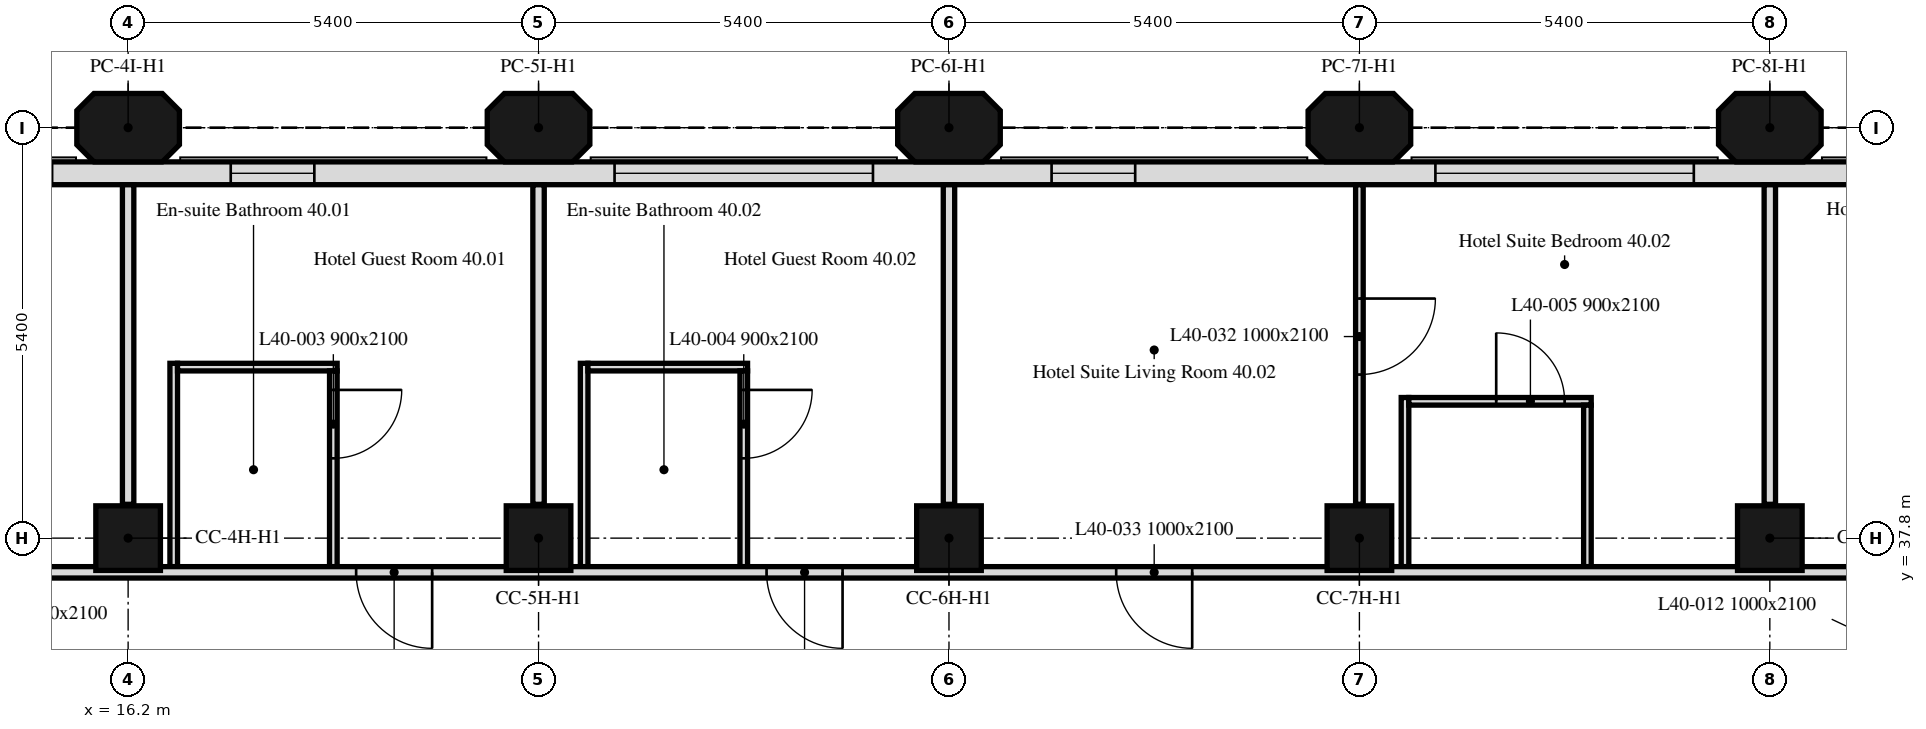
"""IFC4 building model, lengths in metres.
Left out: names, types, materials, properties, quantities, classifications, styles, units other than length and angle.
Written with IfcOpenShell. Run it as: python <this file> out.ifc"""

import sys

from ifc_helpers import new_model, si_unit, direction, frame, frame_2d, origin, origin_2d, place, context, subcontext, project, spatial, polyline, rectangle, outline, extrude, element, fill, save


model = new_model("IFC4")
c1 = context("Model", 3, precision=1e-05, world=origin(), true_north=direction((0.0, 1.0)))
c2 = subcontext(c1, "Body", "Model", "MODEL_VIEW")
j1 = project(units=[si_unit("LENGTHUNIT", "METRE"), si_unit("PLANEANGLEUNIT", "RADIAN")], contexts=[c1])
p1 = place(None, origin())
s1 = spatial("IfcSite", under=j1, at=p1, CompositionType="ELEMENT")
p2 = place(p1, origin())
s2 = spatial("IfcBuilding", under=s1, at=p2, CompositionType="ELEMENT")
p3 = place(p2, frame((0.0, 0.0, 169.3)))
s3 = spatial("IfcBuildingStorey", under=s2, at=p3, CompositionType="ELEMENT", Elevation=169.3)
for number, where, z_axis, x_axis in (
    (1, (16.2, 37.8, 0.0), (0.0, 0.0, 1.0), (1.0, 0.0, 0.0)),
    (2, (21.6, 37.8, 0.0), (0.0, 0.0, 1.0), (1.0, 0.0, 0.0)),
    (3, (27.0, 37.8, 0.0), (0.0, 0.0, 1.0), (1.0, 0.0, 0.0)),
    (4, (32.4, 37.8, 0.0), (0.0, 0.0, 1.0), (1.0, 0.0, 0.0)),
    (5, (37.8, 37.8, 0.0), (0.0, 0.0, 1.0), (1.0, 0.0, 0.0)),
):
    element("IfcColumn", number, at=place(p3, frame(where, z_axis=z_axis, x_axis=x_axis)), inside=s3, PredefinedType="COLUMN", context=c2, shape_type="SweptSolid", body=[
        extrude(rectangle(XDim=0.85, YDim=0.85, at=origin_2d()), origin(), (0.0, 0.0, 1.0), 3.0),
    ])
for number, where, z_axis, x_axis in (
    (6, (16.2, 43.2, 0.0), (0.0, 0.0, 1.0), (1.0, 0.0, 0.0)),
    (7, (21.6, 43.2, 0.0), (0.0, 0.0, 1.0), (1.0, 0.0, 0.0)),
    (8, (27.0, 43.2, 0.0), (0.0, 0.0, 1.0), (1.0, 0.0, 0.0)),
    (9, (32.4, 43.2, 0.0), (0.0, 0.0, 1.0), (1.0, 0.0, 0.0)),
    (10, (37.8, 43.2, 0.0), (0.0, 0.0, 1.0), (1.0, 0.0, 0.0)),
):
    element("IfcColumn", number, at=place(p3, frame(where, z_axis=z_axis, x_axis=x_axis)), inside=s3, PredefinedType="COLUMN", context=c2, shape_type="SweptSolid", body=[
        extrude(outline(polyline([(-0.45, -0.45), (0.45, -0.45), (0.675, -0.225), (0.675, 0.225), (0.45, 0.45), (-0.45, 0.45), (-0.675, 0.225), (-0.675, -0.225), (-0.45, -0.45)])), origin(), (0.0, 0.0, 1.0), 3.0),
    ])
p4 = place(p3, frame((43.014, 42.6, 0.0), z_axis=(0.0, 0.0, 1.0), x_axis=(-1.0, 0.0, 0.0)))
e11 = element("IfcWall", 11, at=p4, inside=s3, PredefinedType="SOLIDWALL", context=c2, shape_type="SweptSolid", body=[
    extrude(rectangle(XDim=32.027, YDim=0.3, at=frame_2d((16.014, 0.0))), origin(), (0.0, 0.0, 1.0), 3.0),
])
p5 = place(p4, frame((2.764, 0.0, 0.9)))
e12 = element("IfcOpeningElement", 12, at=p5, cuts=e11, PredefinedType="OPENING", context=c2, shape_type="SweptSolid", body=[
    extrude(rectangle(XDim=1.1, YDim=1.7, at=frame_2d((0.55, 0.85))), frame((0.0, 0.16, 0.0), z_axis=(0.0, -1.0, 0.0), x_axis=(1.0, 0.0, 0.0)), (0.0, 0.0, 1.0), 0.32),
])
p6 = place(p4, frame((6.214, 0.0, 0.9)))
e13 = element("IfcOpeningElement", 13, at=p6, cuts=e11, PredefinedType="OPENING", context=c2, shape_type="SweptSolid", body=[
    extrude(rectangle(XDim=3.4, YDim=1.7, at=frame_2d((1.7, 0.85))), frame((0.0, 0.16, 0.0), z_axis=(0.0, -1.0, 0.0), x_axis=(1.0, 0.0, 0.0)), (0.0, 0.0, 1.0), 0.32),
])
p7 = place(p4, frame((13.564, 0.0, 0.9)))
e14 = element("IfcOpeningElement", 14, at=p7, cuts=e11, PredefinedType="OPENING", context=c2, shape_type="SweptSolid", body=[
    extrude(rectangle(XDim=1.1, YDim=1.7, at=frame_2d((0.55, 0.85))), frame((0.0, 0.16, 0.0), z_axis=(0.0, -1.0, 0.0), x_axis=(1.0, 0.0, 0.0)), (0.0, 0.0, 1.0), 0.32),
])
p8 = place(p4, frame((17.014, 0.0, 0.9)))
e15 = element("IfcOpeningElement", 15, at=p8, cuts=e11, PredefinedType="OPENING", context=c2, shape_type="SweptSolid", body=[
    extrude(rectangle(XDim=3.4, YDim=1.7, at=frame_2d((1.7, 0.85))), frame((0.0, 0.16, 0.0), z_axis=(0.0, -1.0, 0.0), x_axis=(1.0, 0.0, 0.0)), (0.0, 0.0, 1.0), 0.32),
])
p9 = place(p4, frame((24.364, 0.0, 0.9)))
e16 = element("IfcOpeningElement", 16, at=p9, cuts=e11, PredefinedType="OPENING", context=c2, shape_type="SweptSolid", body=[
    extrude(rectangle(XDim=1.1, YDim=1.7, at=frame_2d((0.55, 0.85))), frame((0.0, 0.16, 0.0), z_axis=(0.0, -1.0, 0.0), x_axis=(1.0, 0.0, 0.0)), (0.0, 0.0, 1.0), 0.32),
])
p10 = place(p4, frame((27.814, 0.0, 0.9)))
e17 = element("IfcOpeningElement", 17, at=p10, cuts=e11, PredefinedType="OPENING", context=c2, shape_type="SweptSolid", body=[
    extrude(rectangle(XDim=3.4, YDim=1.7, at=frame_2d((1.7, 0.85))), frame((0.0, 0.16, 0.0), z_axis=(0.0, -1.0, 0.0), x_axis=(1.0, 0.0, 0.0)), (0.0, 0.0, 1.0), 0.32),
])
p11 = place(p3, frame((16.2, 38.245, 0.0), z_axis=(0.0, 0.0, 1.0), x_axis=(0.0, 1.0, 0.0)))
e18 = element("IfcWall", 18, at=p11, inside=s3, PredefinedType="PARTITIONING", context=c2, shape_type="SweptSolid", body=[
    extrude(rectangle(XDim=4.204, YDim=0.15, at=frame_2d((2.102, 0.0))), origin(), (0.0, 0.0, 1.0), 3.0),
])
p12 = place(p3, frame((16.8, 37.425, 0.0), z_axis=(0.0, 0.0, 1.0), x_axis=(0.0, 1.0, 0.0)))
e19 = element("IfcWall", 19, at=p12, inside=s3, PredefinedType="PARTITIONING", context=c2, shape_type="SweptSolid", body=[
    extrude(rectangle(XDim=2.675, YDim=0.1, at=frame_2d((1.337, 0.0))), origin(), (0.0, 0.0, 1.0), 3.0),
])
p13 = place(p3, frame((16.85, 40.05, 0.0), z_axis=(0.0, 0.0, 1.0), x_axis=(1.0, 0.0, 0.0)))
e20 = element("IfcWall", 20, at=p13, inside=s3, PredefinedType="PARTITIONING", context=c2, shape_type="SweptSolid", body=[
    extrude(rectangle(XDim=2.1, YDim=0.1, at=frame_2d((1.05, 0.0))), origin(), (0.0, 0.0, 1.0), 3.0),
])
p14 = place(p3, frame((18.9, 40.0, 0.0), z_axis=(0.0, 0.0, 1.0), x_axis=(0.0, -1.0, 0.0)))
e21 = element("IfcWall", 21, at=p14, inside=s3, PredefinedType="PARTITIONING", context=c2, shape_type="SweptSolid", body=[
    extrude(rectangle(XDim=2.575, YDim=0.1, at=frame_2d((1.288, 0.0))), origin(), (0.0, 0.0, 1.0), 3.0),
])
p15 = place(p14, frame((0.25, 0.0, 0.0)))
e22 = element("IfcOpeningElement", 22, at=p15, cuts=e21, PredefinedType="OPENING", context=c2, shape_type="SweptSolid", body=[
    extrude(rectangle(XDim=0.9, YDim=2.1, at=frame_2d((0.45, 1.05))), frame((0.0, 0.05, 0.0), z_axis=(0.0, -1.0, 0.0), x_axis=(1.0, 0.0, 0.0)), (0.0, 0.0, 1.0), 0.1),
])
p16 = place(p3, frame((21.6, 38.245, 0.0), z_axis=(0.0, 0.0, 1.0), x_axis=(0.0, 1.0, 0.0)))
e23 = element("IfcWall", 23, at=p16, inside=s3, PredefinedType="PARTITIONING", context=c2, shape_type="SweptSolid", body=[
    extrude(rectangle(XDim=4.204, YDim=0.15, at=frame_2d((2.102, 0.0))), origin(), (0.0, 0.0, 1.0), 3.0),
])
p17 = place(p3, frame((22.2, 37.425, 0.0), z_axis=(0.0, 0.0, 1.0), x_axis=(0.0, 1.0, 0.0)))
e24 = element("IfcWall", 24, at=p17, inside=s3, PredefinedType="PARTITIONING", context=c2, shape_type="SweptSolid", body=[
    extrude(rectangle(XDim=2.675, YDim=0.1, at=frame_2d((1.337, 0.0))), origin(), (0.0, 0.0, 1.0), 3.0),
])
p18 = place(p3, frame((22.25, 40.05, 0.0), z_axis=(0.0, 0.0, 1.0), x_axis=(1.0, 0.0, 0.0)))
e25 = element("IfcWall", 25, at=p18, inside=s3, PredefinedType="PARTITIONING", context=c2, shape_type="SweptSolid", body=[
    extrude(rectangle(XDim=2.1, YDim=0.1, at=frame_2d((1.05, 0.0))), origin(), (0.0, 0.0, 1.0), 3.0),
])
p19 = place(p3, frame((24.3, 40.0, 0.0), z_axis=(0.0, 0.0, 1.0), x_axis=(0.0, -1.0, 0.0)))
e26 = element("IfcWall", 26, at=p19, inside=s3, PredefinedType="PARTITIONING", context=c2, shape_type="SweptSolid", body=[
    extrude(rectangle(XDim=2.575, YDim=0.1, at=frame_2d((1.288, 0.0))), origin(), (0.0, 0.0, 1.0), 3.0),
])
p20 = place(p19, frame((0.25, 0.0, 0.0)))
e27 = element("IfcOpeningElement", 27, at=p20, cuts=e26, PredefinedType="OPENING", context=c2, shape_type="SweptSolid", body=[
    extrude(rectangle(XDim=0.9, YDim=2.1, at=frame_2d((0.45, 1.05))), frame((0.0, 0.05, 0.0), z_axis=(0.0, -1.0, 0.0), x_axis=(1.0, 0.0, 0.0)), (0.0, 0.0, 1.0), 0.1),
])
p21 = place(p3, frame((27.0, 38.245, 0.0), z_axis=(0.0, 0.0, 1.0), x_axis=(0.0, 1.0, 0.0)))
e28 = element("IfcWall", 28, at=p21, inside=s3, PredefinedType="PARTITIONING", context=c2, shape_type="SweptSolid", body=[
    extrude(rectangle(XDim=4.204, YDim=0.15, at=frame_2d((2.102, 0.0))), origin(), (0.0, 0.0, 1.0), 3.0),
])
p22 = place(p3, frame((32.4, 42.449, 0.0), z_axis=(0.0, 0.0, 1.0), x_axis=(0.0, -1.0, 0.0)))
e29 = element("IfcWall", 29, at=p22, inside=s3, PredefinedType="PARTITIONING", context=c2, shape_type="SweptSolid", body=[
    extrude(rectangle(XDim=4.204, YDim=0.1, at=frame_2d((2.102, 0.0))), origin(), (0.0, 0.0, 1.0), 3.0),
])
p23 = place(p22, frame((1.497, 0.0, 0.0)))
e30 = element("IfcOpeningElement", 30, at=p23, cuts=e29, PredefinedType="OPENING", context=c2, shape_type="SweptSolid", body=[
    extrude(rectangle(XDim=1.0, YDim=2.1, at=frame_2d((0.5, 1.05))), frame((0.0, 0.05, 0.0), z_axis=(0.0, -1.0, 0.0), x_axis=(1.0, 0.0, 0.0)), (0.0, 0.0, 1.0), 0.1),
])
p24 = place(p3, frame((33.0, 37.425, 0.0), z_axis=(0.0, 0.0, 1.0), x_axis=(0.0, 1.0, 0.0)))
e31 = element("IfcWall", 31, at=p24, inside=s3, PredefinedType="PARTITIONING", context=c2, shape_type="SweptSolid", body=[
    extrude(rectangle(XDim=2.225, YDim=0.1, at=frame_2d((1.112, 0.0))), origin(), (0.0, 0.0, 1.0), 3.0),
])
p25 = place(p3, frame((33.05, 39.6, 0.0), z_axis=(0.0, 0.0, 1.0), x_axis=(1.0, 0.0, 0.0)))
e32 = element("IfcWall", 32, at=p25, inside=s3, PredefinedType="PARTITIONING", context=c2, shape_type="SweptSolid", body=[
    extrude(rectangle(XDim=2.4, YDim=0.1, at=frame_2d((1.2, 0.0))), origin(), (0.0, 0.0, 1.0), 3.0),
])
p26 = place(p25, frame((1.15, 0.0, 0.0)))
e33 = element("IfcOpeningElement", 33, at=p26, cuts=e32, PredefinedType="OPENING", context=c2, shape_type="SweptSolid", body=[
    extrude(rectangle(XDim=0.9, YDim=2.1, at=frame_2d((0.45, 1.05))), frame((0.0, 0.05, 0.0), z_axis=(0.0, -1.0, 0.0), x_axis=(1.0, 0.0, 0.0)), (0.0, 0.0, 1.0), 0.1),
])
p27 = place(p3, frame((35.4, 39.55, 0.0), z_axis=(0.0, 0.0, 1.0), x_axis=(0.0, -1.0, 0.0)))
e34 = element("IfcWall", 34, at=p27, inside=s3, PredefinedType="PARTITIONING", context=c2, shape_type="SweptSolid", body=[
    extrude(rectangle(XDim=2.125, YDim=0.1, at=frame_2d((1.062, 0.0))), origin(), (0.0, 0.0, 1.0), 3.0),
])
p28 = place(p3, frame((37.8, 38.245, 0.0), z_axis=(0.0, 0.0, 1.0), x_axis=(0.0, 1.0, 0.0)))
e35 = element("IfcWall", 35, at=p28, inside=s3, PredefinedType="PARTITIONING", context=c2, shape_type="SweptSolid", body=[
    extrude(rectangle(XDim=4.204, YDim=0.15, at=frame_2d((2.102, 0.0))), origin(), (0.0, 0.0, 1.0), 3.0),
])
p29 = place(p3, frame((47.849, 37.35, 0.0), z_axis=(0.0, 0.0, 1.0), x_axis=(-1.0, 0.0, 0.0)))
e36 = element("IfcWall", 36, at=p29, inside=s3, PredefinedType="PARTITIONING", context=c2, shape_type="SweptSolid", body=[
    extrude(rectangle(XDim=41.698, YDim=0.15, at=frame_2d((20.849, 0.0))), origin(), (0.0, 0.0, 1.0), 3.0),
])
p30 = place(p29, frame((39.249, 0.0, 0.0)))
e37 = element("IfcOpeningElement", 37, at=p30, cuts=e36, PredefinedType="OPENING", context=c2, shape_type="SweptSolid", body=[
    extrude(rectangle(XDim=1.0, YDim=2.1, at=frame_2d((0.5, 1.05))), frame((0.0, 0.075, 0.0), z_axis=(0.0, -1.0, 0.0), x_axis=(1.0, 0.0, 0.0)), (0.0, 0.0, 1.0), 0.15),
])
p31 = place(p29, frame((27.649, 0.0, 0.0)))
e38 = element("IfcOpeningElement", 38, at=p31, cuts=e36, PredefinedType="OPENING", context=c2, shape_type="SweptSolid", body=[
    extrude(rectangle(XDim=1.0, YDim=2.1, at=frame_2d((0.5, 1.05))), frame((0.0, 0.075, 0.0), z_axis=(0.0, -1.0, 0.0), x_axis=(1.0, 0.0, 0.0)), (0.0, 0.0, 1.0), 0.15),
])
p32 = place(p29, frame((22.249, 0.0, 0.0)))
e39 = element("IfcOpeningElement", 39, at=p32, cuts=e36, PredefinedType="OPENING", context=c2, shape_type="SweptSolid", body=[
    extrude(rectangle(XDim=1.0, YDim=2.1, at=frame_2d((0.5, 1.05))), frame((0.0, 0.075, 0.0), z_axis=(0.0, -1.0, 0.0), x_axis=(1.0, 0.0, 0.0)), (0.0, 0.0, 1.0), 0.15),
])
p33 = place(p29, frame((17.649, 0.0, 0.0)))
e40 = element("IfcOpeningElement", 40, at=p33, cuts=e36, PredefinedType="OPENING", context=c2, shape_type="SweptSolid", body=[
    extrude(rectangle(XDim=1.0, YDim=2.1, at=frame_2d((0.5, 1.05))), frame((0.0, 0.075, 0.0), z_axis=(0.0, -1.0, 0.0), x_axis=(1.0, 0.0, 0.0)), (0.0, 0.0, 1.0), 0.15),
])
p34 = place(p29, frame((2.744, 0.0, 0.0)))
e41 = element("IfcOpeningElement", 41, at=p34, cuts=e36, PredefinedType="OPENING", context=c2, shape_type="SweptSolid", body=[
    extrude(rectangle(XDim=1.0, YDim=2.1, at=frame_2d((0.5, 1.05))), frame((0.0, 0.075, 0.0), z_axis=(0.0, -1.0, 0.0), x_axis=(1.0, 0.0, 0.0)), (0.0, 0.0, 1.0), 0.15),
])
p35 = place(p6, origin())
e42 = element("IfcWindow", 42, at=p35, inside=s3, PartitioningType="SINGLE_PANEL", PredefinedType="WINDOW", context=c2, shape_type="SweptSolid", body=[
    extrude(rectangle(XDim=3.4, YDim=1.7, at=frame_2d((1.7, 0.85))), frame((0.0, 0.03, 0.0), z_axis=(0.0, -1.0, 0.0), x_axis=(1.0, 0.0, 0.0)), (0.0, 0.0, 1.0), 0.06),
])
fill(e13, e42)
p36 = place(p7, origin())
e43 = element("IfcWindow", 43, at=p36, inside=s3, PartitioningType="SINGLE_PANEL", PredefinedType="WINDOW", context=c2, shape_type="SweptSolid", body=[
    extrude(rectangle(XDim=1.1, YDim=1.7, at=frame_2d((0.55, 0.85))), frame((0.0, 0.03, 0.0), z_axis=(0.0, -1.0, 0.0), x_axis=(1.0, 0.0, 0.0)), (0.0, 0.0, 1.0), 0.06),
])
fill(e14, e43)
p37 = place(p8, origin())
e44 = element("IfcWindow", 44, at=p37, inside=s3, PartitioningType="SINGLE_PANEL", PredefinedType="WINDOW", context=c2, shape_type="SweptSolid", body=[
    extrude(rectangle(XDim=3.4, YDim=1.7, at=frame_2d((1.7, 0.85))), frame((0.0, 0.03, 0.0), z_axis=(0.0, -1.0, 0.0), x_axis=(1.0, 0.0, 0.0)), (0.0, 0.0, 1.0), 0.06),
])
fill(e15, e44)
p38 = place(p9, origin())
e45 = element("IfcWindow", 45, at=p38, inside=s3, PartitioningType="SINGLE_PANEL", PredefinedType="WINDOW", context=c2, shape_type="SweptSolid", body=[
    extrude(rectangle(XDim=1.1, YDim=1.7, at=frame_2d((0.55, 0.85))), frame((0.0, 0.03, 0.0), z_axis=(0.0, -1.0, 0.0), x_axis=(1.0, 0.0, 0.0)), (0.0, 0.0, 1.0), 0.06),
])
fill(e16, e45)
p39 = place(p15, origin())
e46 = element("IfcDoor", 46, at=p39, inside=s3, OperationType="SINGLE_SWING_RIGHT", PredefinedType="DOOR", context=c2, shape_type="SweptSolid", body=[
    extrude(rectangle(XDim=0.9, YDim=2.1, at=frame_2d((0.45, 1.05))), frame((0.0, 0.025, 0.0), z_axis=(0.0, -1.0, 0.0), x_axis=(1.0, 0.0, 0.0)), (0.0, 0.0, 1.0), 0.05),
])
fill(e22, e46)
p40 = place(p20, origin())
e47 = element("IfcDoor", 47, at=p40, inside=s3, OperationType="SINGLE_SWING_LEFT", PredefinedType="DOOR", context=c2, shape_type="SweptSolid", body=[
    extrude(rectangle(XDim=0.9, YDim=2.1, at=frame_2d((0.45, 1.05))), frame((0.0, 0.025, 0.0), z_axis=(0.0, -1.0, 0.0), x_axis=(1.0, 0.0, 0.0)), (0.0, 0.0, 1.0), 0.05),
])
fill(e27, e47)
p41 = place(p26, origin())
e48 = element("IfcDoor", 48, at=p41, inside=s3, OperationType="SINGLE_SWING_LEFT", PredefinedType="DOOR", context=c2, shape_type="SweptSolid", body=[
    extrude(rectangle(XDim=0.9, YDim=2.1, at=frame_2d((0.45, 1.05))), frame((0.0, 0.025, 0.0), z_axis=(0.0, -1.0, 0.0), x_axis=(1.0, 0.0, 0.0)), (0.0, 0.0, 1.0), 0.05),
])
fill(e33, e48)
p42 = place(p31, origin())
e49 = element("IfcDoor", 49, at=p42, inside=s3, OperationType="SINGLE_SWING_LEFT", PredefinedType="DOOR", context=c2, shape_type="SweptSolid", body=[
    extrude(rectangle(XDim=1.0, YDim=2.1, at=frame_2d((0.5, 1.05))), frame((0.0, 0.025, 0.0), z_axis=(0.0, -1.0, 0.0), x_axis=(1.0, 0.0, 0.0)), (0.0, 0.0, 1.0), 0.05),
])
fill(e38, e49)
p43 = place(p32, origin())
e50 = element("IfcDoor", 50, at=p43, inside=s3, OperationType="SINGLE_SWING_LEFT", PredefinedType="DOOR", context=c2, shape_type="SweptSolid", body=[
    extrude(rectangle(XDim=1.0, YDim=2.1, at=frame_2d((0.5, 1.05))), frame((0.0, 0.025, 0.0), z_axis=(0.0, -1.0, 0.0), x_axis=(1.0, 0.0, 0.0)), (0.0, 0.0, 1.0), 0.05),
])
fill(e39, e50)
p44 = place(p23, origin())
e51 = element("IfcDoor", 51, at=p44, inside=s3, OperationType="SINGLE_SWING_LEFT", PredefinedType="DOOR", context=c2, shape_type="SweptSolid", body=[
    extrude(rectangle(XDim=1.0, YDim=2.1, at=frame_2d((0.5, 1.05))), frame((0.0, 0.025, 0.0), z_axis=(0.0, -1.0, 0.0), x_axis=(1.0, 0.0, 0.0)), (0.0, 0.0, 1.0), 0.05),
])
fill(e30, e51)
p45 = place(p33, origin())
e52 = element("IfcDoor", 52, at=p45, inside=s3, OperationType="SINGLE_SWING_LEFT", PredefinedType="DOOR", context=c2, shape_type="SweptSolid", body=[
    extrude(rectangle(XDim=1.0, YDim=2.1, at=frame_2d((0.5, 1.05))), frame((0.0, 0.025, 0.0), z_axis=(0.0, -1.0, 0.0), x_axis=(1.0, 0.0, 0.0)), (0.0, 0.0, 1.0), 0.05),
])
fill(e40, e52)
save(model, sys.argv[1])
